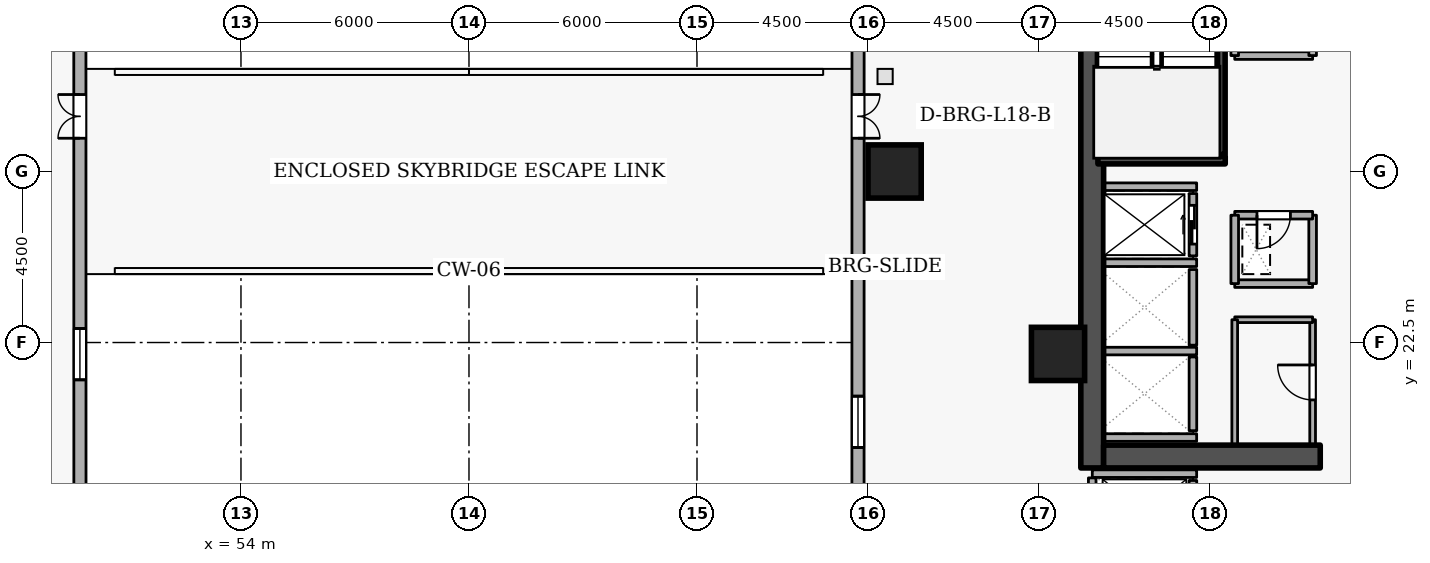
"""IFC4 building model, lengths in metres.
Left out: names, types, materials, properties, quantities, classifications, styles, units other than length and angle.
Written with IfcOpenShell. Run it as: python <this file> out.ifc"""

import sys

from ifc_helpers import new_model, si_unit, direction, frame, frame_2d, origin, origin_2d, place, context, subcontext, project, spatial, rectangle, extrude, element, fill, save


model = new_model("IFC4")
c1 = context("Model", 3, precision=1e-05, world=origin(), true_north=direction((0.0, 1.0)))
c2 = subcontext(c1, "Body", "Model", "MODEL_VIEW")
j1 = project(units=[si_unit("LENGTHUNIT", "METRE"), si_unit("PLANEANGLEUNIT", "RADIAN")], contexts=[c1])
p1 = place(None, origin())
s1 = spatial("IfcSite", under=j1, at=p1, CompositionType="ELEMENT")
p2 = place(p1, origin())
s2 = spatial("IfcBuilding", under=s1, at=p2, CompositionType="ELEMENT")
p3 = place(p2, frame((0.0, 0.0, 71.7)))
s3 = spatial("IfcBuildingStorey", under=s2, at=p3, CompositionType="ELEMENT", Elevation=71.7)
p4 = place(p3, frame((76.4, 19.2, 0.0), z_axis=(0.0, 0.0, 1.0), x_axis=(0.0, 1.0, 0.0)))
e1 = element("IfcWall", 1, at=p4, inside=s3, PredefinedType="SHEAR", context=c2, shape_type="SweptSolid", body=[
    extrude(rectangle(XDim=15.6, YDim=0.6, at=frame_2d((7.8, 0.0))), origin(), (0.0, 0.0, 1.0), 4.2),
])
p5 = place(p3, frame((76.7, 19.5, 0.0), z_axis=(0.0, 0.0, 1.0), x_axis=(1.0, 0.0, 0.0)))
e2 = element("IfcWall", 2, at=p5, inside=s3, PredefinedType="SHEAR", context=c2, shape_type="SweptSolid", body=[
    extrude(rectangle(XDim=5.7, YDim=0.6, at=frame_2d((2.85, 0.0))), origin(), (0.0, 0.0, 1.0), 4.2),
])
for number, where, z_axis, x_axis in (
    (3, (71.2, 27.0, 0.0), (0.0, 0.0, 1.0), (1.0, 0.0, 0.0)),
    (4, (75.5, 22.2, 0.0), (0.0, 0.0, 1.0), (1.0, 0.0, 0.0)),
):
    element("IfcColumn", number, at=place(p3, frame(where, z_axis=z_axis, x_axis=x_axis)), inside=s3, PredefinedType="COLUMN", context=c2, shape_type="SweptSolid", body=[
        extrude(rectangle(XDim=1.4, YDim=1.4, at=origin_2d()), origin(), (0.0, 0.0, 1.0), 4.2),
    ])
p6 = place(p3, frame((49.765, 5.319, 0.0), z_axis=(0.0, 0.0, 1.0), x_axis=(-0.000164732205, 0.999999986432, 0.0)))
e5 = element("IfcWall", 5, at=p6, inside=s3, PredefinedType="STANDARD", context=c2, shape_type="SweptSolid", body=[
    extrude(rectangle(XDim=35.569, YDim=0.32, at=frame_2d((17.785, 0.0))), origin(), (0.0, 0.0, 1.0), 2.24),
])
p7 = place(p6, frame((22.556, 0.0, 0.0)))
e6 = element("IfcOpeningElement", 6, at=p7, cuts=e5, PredefinedType="OPENING", context=c2, shape_type="SweptSolid", body=[
    extrude(rectangle(XDim=1.15, YDim=2.1, at=frame_2d((0.575, 1.05))), frame((0.0, 0.17, 0.0), z_axis=(0.0, -1.0, 0.0), x_axis=(1.0, 0.0, 0.0)), (0.0, 0.0, 1.0), 0.34),
])
p8 = place(p6, frame((1.8, 0.0, 0.72)))
e7 = element("IfcOpeningElement", 7, at=p8, cuts=e5, PredefinedType="OPENING", context=c2, shape_type="SweptSolid", body=[
    extrude(rectangle(XDim=1.35, YDim=1.05, at=frame_2d((0.675, 0.525))), frame((0.0, 0.17, 0.0), z_axis=(0.0, -1.0, 0.0), x_axis=(1.0, 0.0, 0.0)), (0.0, 0.0, 1.0), 0.34),
])
p9 = place(p6, frame((6.6, 0.0, 0.72)))
e8 = element("IfcOpeningElement", 8, at=p9, cuts=e5, PredefinedType="OPENING", context=c2, shape_type="SweptSolid", body=[
    extrude(rectangle(XDim=1.35, YDim=1.05, at=frame_2d((0.675, 0.525))), frame((0.0, 0.17, 0.0), z_axis=(0.0, -1.0, 0.0), x_axis=(1.0, 0.0, 0.0)), (0.0, 0.0, 1.0), 0.34),
])
p10 = place(p6, frame((11.4, 0.0, 0.72)))
e9 = element("IfcOpeningElement", 9, at=p10, cuts=e5, PredefinedType="OPENING", context=c2, shape_type="SweptSolid", body=[
    extrude(rectangle(XDim=1.35, YDim=1.05, at=frame_2d((0.675, 0.525))), frame((0.0, 0.17, 0.0), z_axis=(0.0, -1.0, 0.0), x_axis=(1.0, 0.0, 0.0)), (0.0, 0.0, 1.0), 0.34),
])
p11 = place(p6, frame((16.2, 0.0, 0.72)))
e10 = element("IfcOpeningElement", 10, at=p11, cuts=e5, PredefinedType="OPENING", context=c2, shape_type="SweptSolid", body=[
    extrude(rectangle(XDim=1.35, YDim=1.05, at=frame_2d((0.675, 0.525))), frame((0.0, 0.17, 0.0), z_axis=(0.0, -1.0, 0.0), x_axis=(1.0, 0.0, 0.0)), (0.0, 0.0, 1.0), 0.34),
])
p12 = place(p6, frame((25.8, 0.0, 0.72)))
e11 = element("IfcOpeningElement", 11, at=p12, cuts=e5, PredefinedType="OPENING", context=c2, shape_type="SweptSolid", body=[
    extrude(rectangle(XDim=1.35, YDim=1.05, at=frame_2d((0.675, 0.525))), frame((0.0, 0.17, 0.0), z_axis=(0.0, -1.0, 0.0), x_axis=(1.0, 0.0, 0.0)), (0.0, 0.0, 1.0), 0.34),
])
p13 = place(p6, frame((30.6, 0.0, 0.72)))
e12 = element("IfcOpeningElement", 12, at=p13, cuts=e5, PredefinedType="OPENING", context=c2, shape_type="SweptSolid", body=[
    extrude(rectangle(XDim=1.35, YDim=1.05, at=frame_2d((0.675, 0.525))), frame((0.0, 0.17, 0.0), z_axis=(0.0, -1.0, 0.0), x_axis=(1.0, 0.0, 0.0)), (0.0, 0.0, 1.0), 0.34),
])
p14 = place(p3, frame((70.241, 46.888, 0.0), z_axis=(0.0, 0.0, 1.0), x_axis=(-0.000164732205, -0.999999986432, 0.0)))
e13 = element("IfcWall", 13, at=p14, inside=s3, PredefinedType="STANDARD", context=c2, shape_type="SweptSolid", body=[
    extrude(rectangle(XDim=35.569, YDim=0.32, at=frame_2d((17.785, 0.0))), origin(), (0.0, 0.0, 1.0), 2.24),
])
p15 = place(p14, frame((17.863, 0.0, 0.0)))
e14 = element("IfcOpeningElement", 14, at=p15, cuts=e13, PredefinedType="OPENING", context=c2, shape_type="SweptSolid", body=[
    extrude(rectangle(XDim=1.15, YDim=2.1, at=frame_2d((0.575, 1.05))), frame((0.0, 0.17, 0.0), z_axis=(0.0, -1.0, 0.0), x_axis=(1.0, 0.0, 0.0)), (0.0, 0.0, 1.0), 0.34),
])
p16 = place(p14, frame((1.8, 0.0, 0.72)))
e15 = element("IfcOpeningElement", 15, at=p16, cuts=e13, PredefinedType="OPENING", context=c2, shape_type="SweptSolid", body=[
    extrude(rectangle(XDim=1.35, YDim=1.05, at=frame_2d((0.675, 0.525))), frame((0.0, 0.17, 0.0), z_axis=(0.0, -1.0, 0.0), x_axis=(1.0, 0.0, 0.0)), (0.0, 0.0, 1.0), 0.34),
])
p17 = place(p14, frame((11.4, 0.0, 0.72)))
e16 = element("IfcOpeningElement", 16, at=p17, cuts=e13, PredefinedType="OPENING", context=c2, shape_type="SweptSolid", body=[
    extrude(rectangle(XDim=1.35, YDim=1.05, at=frame_2d((0.675, 0.525))), frame((0.0, 0.17, 0.0), z_axis=(0.0, -1.0, 0.0), x_axis=(1.0, 0.0, 0.0)), (0.0, 0.0, 1.0), 0.34),
])
p18 = place(p14, frame((25.8, 0.0, 0.72)))
e17 = element("IfcOpeningElement", 17, at=p18, cuts=e13, PredefinedType="OPENING", context=c2, shape_type="SweptSolid", body=[
    extrude(rectangle(XDim=1.35, YDim=1.05, at=frame_2d((0.675, 0.525))), frame((0.0, 0.17, 0.0), z_axis=(0.0, -1.0, 0.0), x_axis=(1.0, 0.0, 0.0)), (0.0, 0.0, 1.0), 0.34),
])
p19 = place(p3, frame((79.05, 24.78, 0.0), z_axis=(0.0, 0.0, 1.0), x_axis=(0.0, 1.0, 0.0)))
e18 = element("IfcWall", 18, at=p19, inside=s3, PredefinedType="STANDARD", context=c2, shape_type="SweptSolid", body=[
    extrude(rectangle(XDim=1.64, YDim=0.2, at=frame_2d((0.82, 0.0))), origin(), (0.0, 0.0, 1.0), 3.86),
])
p20 = place(p19, frame((0.31, 0.0, 0.0)))
e19 = element("IfcOpeningElement", 19, at=p20, cuts=e18, PredefinedType="OPENING", context=c2, shape_type="SweptSolid", body=[
    extrude(rectangle(XDim=1.02, YDim=2.06, at=frame_2d((0.51, 1.03))), frame((0.0, 0.11, 0.0), z_axis=(0.0, -1.0, 0.0), x_axis=(1.0, 0.0, 0.0)), (0.0, 0.0, 1.0), 0.22),
])
p21 = place(p3, frame((79.05, 22.43, 0.0), z_axis=(0.0, 0.0, 1.0), x_axis=(0.0, 1.0, 0.0)))
e20 = element("IfcWall", 20, at=p21, inside=s3, PredefinedType="STANDARD", context=c2, shape_type="SweptSolid", body=[
    extrude(rectangle(XDim=1.99, YDim=0.2, at=frame_2d((0.995, 0.0))), origin(), (0.0, 0.0, 1.0), 3.86),
])
p22 = place(p3, frame((79.05, 20.18, 0.0), z_axis=(0.0, 0.0, 1.0), x_axis=(0.0, 1.0, 0.0)))
e21 = element("IfcWall", 21, at=p22, inside=s3, PredefinedType="STANDARD", context=c2, shape_type="SweptSolid", body=[
    extrude(rectangle(XDim=1.94, YDim=0.2, at=frame_2d((0.97, 0.0))), origin(), (0.0, 0.0, 1.0), 3.86),
])
p23 = place(p3, frame((79.05, 17.13, 0.0), z_axis=(0.0, 0.0, 1.0), x_axis=(0.0, 1.0, 0.0)))
e22 = element("IfcWall", 22, at=p23, inside=s3, PredefinedType="STANDARD", context=c2, shape_type="SweptSolid", body=[
    extrude(rectangle(XDim=1.74, YDim=0.2, at=frame_2d((0.87, 0.0))), origin(), (0.0, 0.0, 1.0), 3.86),
])
p24 = place(p23, frame((0.36, 0.0, 0.0)))
e23 = element("IfcOpeningElement", 23, at=p24, cuts=e22, PredefinedType="OPENING", context=c2, shape_type="SweptSolid", body=[
    extrude(rectangle(XDim=1.02, YDim=2.06, at=frame_2d((0.51, 1.03))), frame((0.0, 0.11, 0.0), z_axis=(0.0, -1.0, 0.0), x_axis=(1.0, 0.0, 0.0)), (0.0, 0.0, 1.0), 0.22),
])
p25 = place(p3, frame((76.712, 26.6, 0.0), z_axis=(0.0, 0.0, 1.0), x_axis=(1.0, 0.0, 0.0)))
e24 = element("IfcWall", 24, at=p25, inside=s3, PredefinedType="STANDARD", context=c2, shape_type="SweptSolid", body=[
    extrude(rectangle(XDim=2.436, YDim=0.2, at=frame_2d((1.218, 0.0))), origin(), (0.0, 0.0, 1.0), 2.285),
])
for number, where, z_axis, x_axis in (
    (25, (76.712, 24.6, 0.0), (0.0, 0.0, 1.0), (1.0, 0.0, 0.0)),
    (26, (76.712, 22.275, 0.0), (0.0, 0.0, 1.0), (1.0, 0.0, 0.0)),
    (27, (76.712, 20.0, 0.0), (0.0, 0.0, 1.0), (1.0, 0.0, 0.0)),
):
    element("IfcWall", number, at=place(p3, frame(where, z_axis=z_axis, x_axis=x_axis)), inside=s3, PredefinedType="STANDARD", context=c2, shape_type="SweptSolid", body=[
        extrude(rectangle(XDim=2.436, YDim=0.2, at=frame_2d((1.218, 0.0))), origin(), (0.0, 0.0, 1.0), 3.86),
    ])
p26 = place(p3, frame((76.402, 19.05, 0.0), z_axis=(0.0, 0.0, 1.0), x_axis=(1.0, 0.0, 0.0)))
e28 = element("IfcWall", 28, at=p26, inside=s3, PredefinedType="STANDARD", context=c2, shape_type="SweptSolid", body=[
    extrude(rectangle(XDim=2.746, YDim=0.2, at=frame_2d((1.373, 0.0))), origin(), (0.0, 0.0, 1.0), 3.065),
])
p27 = place(p3, frame((76.4, 17.082, 0.0), z_axis=(0.0, 0.0, 1.0), x_axis=(0.0, 1.0, 0.0)))
e29 = element("IfcWall", 29, at=p27, inside=s3, PredefinedType="STANDARD", context=c2, shape_type="SweptSolid", body=[
    extrude(rectangle(XDim=1.856, YDim=0.2, at=frame_2d((0.928, 0.0))), origin(), (0.0, 0.0, 1.0), 3.86),
])
p28 = place(p3, frame((79.9, 27.3, 0.0), z_axis=(0.0, 0.0, 1.0), x_axis=(-1.0, 0.0, 0.0)))
e30 = element("IfcWall", 30, at=p28, inside=s3, PredefinedType="SHEAR", context=c2, shape_type="SweptSolid", body=[
    extrude(rectangle(XDim=3.35, YDim=0.2, at=frame_2d((1.675, 0.0))), origin(), (0.0, 0.0, 1.0), 4.2),
])
p29 = place(p3, frame((79.797, 27.45, 0.0), z_axis=(0.0, 0.0, 1.0), x_axis=(0.0, 1.0, 0.0)))
e31 = element("IfcWall", 31, at=p29, inside=s3, PredefinedType="SHEAR", context=c2, shape_type="SweptSolid", body=[
    extrude(rectangle(XDim=7.1, YDim=0.2, at=frame_2d((3.55, 0.0))), origin(), (0.0, 0.0, 1.0), 4.2),
])
p30 = place(p3, frame((80.15, 24.05, 0.0), z_axis=(0.0, 0.0, 1.0), x_axis=(1.0, 0.0, 0.0)))
e32 = element("IfcWall", 32, at=p30, inside=s3, PredefinedType="STANDARD", context=c2, shape_type="SweptSolid", body=[
    extrude(rectangle(XDim=2.05, YDim=0.2, at=frame_2d((1.025, 0.0))), origin(), (0.0, 0.0, 1.0), 3.86),
])
p31 = place(p3, frame((82.2, 24.05, 0.0), z_axis=(0.0, 0.0, 1.0), x_axis=(0.0, 1.0, 0.0)))
e33 = element("IfcWall", 33, at=p31, inside=s3, PredefinedType="STANDARD", context=c2, shape_type="SweptSolid", body=[
    extrude(rectangle(XDim=1.8, YDim=0.2, at=frame_2d((0.9, 0.0))), origin(), (0.0, 0.0, 1.0), 3.86),
])
p32 = place(p3, frame((82.2, 25.85, 0.0), z_axis=(0.0, 0.0, 1.0), x_axis=(-1.0, 0.0, 0.0)))
e34 = element("IfcWall", 34, at=p32, inside=s3, PredefinedType="STANDARD", context=c2, shape_type="SweptSolid", body=[
    extrude(rectangle(XDim=2.05, YDim=0.2, at=frame_2d((1.025, 0.0))), origin(), (0.0, 0.0, 1.0), 3.86),
])
p33 = place(p32, frame((0.585, 0.0, 0.0)))
e35 = element("IfcOpeningElement", 35, at=p33, cuts=e34, PredefinedType="OPENING", context=c2, shape_type="SweptSolid", body=[
    extrude(rectangle(XDim=0.88, YDim=2.04, at=frame_2d((0.44, 1.02))), frame((0.0, 0.11, 0.0), z_axis=(0.0, -1.0, 0.0), x_axis=(1.0, 0.0, 0.0)), (0.0, 0.0, 1.0), 0.22),
])
p34 = place(p3, frame((80.15, 25.85, 0.0), z_axis=(0.0, 0.0, 1.0), x_axis=(0.0, -1.0, 0.0)))
e36 = element("IfcWall", 36, at=p34, inside=s3, PredefinedType="STANDARD", context=c2, shape_type="SweptSolid", body=[
    extrude(rectangle(XDim=1.8, YDim=0.2, at=frame_2d((0.9, 0.0))), origin(), (0.0, 0.0, 1.0), 3.86),
])
p35 = place(p3, frame((80.15, 30.05, 0.0), z_axis=(0.0, 0.0, 1.0), x_axis=(1.0, 0.0, 0.0)))
e37 = element("IfcWall", 37, at=p35, inside=s3, PredefinedType="STANDARD", context=c2, shape_type="SweptSolid", body=[
    extrude(rectangle(XDim=2.05, YDim=0.2, at=frame_2d((1.025, 0.0))), origin(), (0.0, 0.0, 1.0), 3.86),
])
p36 = place(p3, frame((82.2, 30.05, 0.0), z_axis=(0.0, 0.0, 1.0), x_axis=(0.0, 1.0, 0.0)))
e38 = element("IfcWall", 38, at=p36, inside=s3, PredefinedType="STANDARD", context=c2, shape_type="SweptSolid", body=[
    extrude(rectangle(XDim=1.8, YDim=0.2, at=frame_2d((0.9, 0.0))), origin(), (0.0, 0.0, 1.0), 3.86),
])
p37 = place(p36, frame((0.46, 0.0, 0.0)))
e39 = element("IfcOpeningElement", 39, at=p37, cuts=e38, PredefinedType="OPENING", context=c2, shape_type="SweptSolid", body=[
    extrude(rectangle(XDim=0.88, YDim=2.04, at=frame_2d((0.44, 1.02))), frame((0.0, 0.11, 0.0), z_axis=(0.0, -1.0, 0.0), x_axis=(1.0, 0.0, 0.0)), (0.0, 0.0, 1.0), 0.22),
])
p38 = place(p3, frame((80.15, 31.85, 0.0), z_axis=(0.0, 0.0, 1.0), x_axis=(0.0, -1.0, 0.0)))
e40 = element("IfcWall", 40, at=p38, inside=s3, PredefinedType="STANDARD", context=c2, shape_type="SweptSolid", body=[
    extrude(rectangle(XDim=1.8, YDim=0.2, at=frame_2d((0.9, 0.0))), origin(), (0.0, 0.0, 1.0), 3.86),
])
p39 = place(p3, frame((82.2, 19.8, 0.0), z_axis=(0.0, 0.0, 1.0), x_axis=(0.0, 1.0, 0.0)))
e41 = element("IfcWall", 41, at=p39, inside=s3, PredefinedType="PARTITIONING", context=c2, shape_type="SweptSolid", body=[
    extrude(rectangle(XDim=3.3, YDim=0.15, at=frame_2d((1.65, 0.0))), origin(), (0.0, 0.0, 1.0), 3.86),
])
p40 = place(p39, frame((1.19, 0.0, 0.0)))
e42 = element("IfcOpeningElement", 42, at=p40, cuts=e41, PredefinedType="OPENING", context=c2, shape_type="SweptSolid", body=[
    extrude(rectangle(XDim=0.92, YDim=2.08, at=frame_2d((0.46, 1.04))), frame((0.0, 0.085, 0.0), z_axis=(0.0, -1.0, 0.0), x_axis=(1.0, 0.0, 0.0)), (0.0, 0.0, 1.0), 0.17),
])
p41 = place(p3, frame((82.2, 23.1, 0.0), z_axis=(0.0, 0.0, 1.0), x_axis=(-1.0, 0.0, 0.0)))
e43 = element("IfcWall", 43, at=p41, inside=s3, PredefinedType="PARTITIONING", context=c2, shape_type="SweptSolid", body=[
    extrude(rectangle(XDim=2.05, YDim=0.15, at=frame_2d((1.025, 0.0))), origin(), (0.0, 0.0, 1.0), 3.86),
])
p42 = place(p3, frame((80.15, 23.1, 0.0), z_axis=(0.0, 0.0, 1.0), x_axis=(0.0, -1.0, 0.0)))
e44 = element("IfcWall", 44, at=p42, inside=s3, PredefinedType="PARTITIONING", context=c2, shape_type="SweptSolid", body=[
    extrude(rectangle(XDim=3.3, YDim=0.15, at=frame_2d((1.65, 0.0))), origin(), (0.0, 0.0, 1.0), 3.86),
])
p43 = place(p7, origin())
e45 = element("IfcDoor", 45, at=p43, inside=s3, OperationType="DOUBLE_DOOR_SINGLE_SWING", PredefinedType="DOOR", context=c2, shape_type="SweptSolid", body=[
    extrude(rectangle(XDim=1.15, YDim=2.1, at=frame_2d((0.575, 1.05))), frame((0.0, 0.025, 0.0), z_axis=(0.0, -1.0, 0.0), x_axis=(1.0, 0.0, 0.0)), (0.0, 0.0, 1.0), 0.05),
])
fill(e6, e45)
p44 = place(p11, origin())
e46 = element("IfcWindow", 46, at=p44, inside=s3, PartitioningType="SINGLE_PANEL", PredefinedType="WINDOW", context=c2, shape_type="SweptSolid", body=[
    extrude(rectangle(XDim=1.35, YDim=1.05, at=frame_2d((0.675, 0.525))), frame((0.0, 0.03, 0.0), z_axis=(0.0, -1.0, 0.0), x_axis=(1.0, 0.0, 0.0)), (0.0, 0.0, 1.0), 0.06),
])
fill(e10, e46)
p45 = place(p15, origin())
e47 = element("IfcDoor", 47, at=p45, inside=s3, OperationType="DOUBLE_DOOR_SINGLE_SWING", PredefinedType="DOOR", context=c2, shape_type="SweptSolid", body=[
    extrude(rectangle(XDim=1.15, YDim=2.1, at=frame_2d((0.575, 1.05))), frame((0.0, 0.025, 0.0), z_axis=(0.0, -1.0, 0.0), x_axis=(1.0, 0.0, 0.0)), (0.0, 0.0, 1.0), 0.05),
])
fill(e14, e47)
p46 = place(p18, origin())
e48 = element("IfcWindow", 48, at=p46, inside=s3, PartitioningType="SINGLE_PANEL", PredefinedType="WINDOW", context=c2, shape_type="SweptSolid", body=[
    extrude(rectangle(XDim=1.35, YDim=1.05, at=frame_2d((0.675, 0.525))), frame((0.0, 0.03, 0.0), z_axis=(0.0, -1.0, 0.0), x_axis=(1.0, 0.0, 0.0)), (0.0, 0.0, 1.0), 0.06),
])
fill(e17, e48)
p47 = place(p20, origin())
e49 = element("IfcDoor", 49, at=p47, inside=s3, OperationType="SLIDING_TO_LEFT", PredefinedType="DOOR", context=c2, shape_type="SweptSolid", body=[
    extrude(rectangle(XDim=1.02, YDim=2.06, at=frame_2d((0.51, 1.03))), frame((0.0, 0.025, 0.0), z_axis=(0.0, -1.0, 0.0), x_axis=(1.0, 0.0, 0.0)), (0.0, 0.0, 1.0), 0.05),
])
fill(e19, e49)
p48 = place(p33, origin())
e50 = element("IfcDoor", 50, at=p48, inside=s3, OperationType="SINGLE_SWING_RIGHT", PredefinedType="DOOR", context=c2, shape_type="SweptSolid", body=[
    extrude(rectangle(XDim=0.88, YDim=2.04, at=frame_2d((0.44, 1.02))), frame((0.0, 0.025, 0.0), z_axis=(0.0, -1.0, 0.0), x_axis=(1.0, 0.0, 0.0)), (0.0, 0.0, 1.0), 0.05),
])
fill(e35, e50)
p49 = place(p40, origin())
e51 = element("IfcDoor", 51, at=p49, inside=s3, OperationType="SINGLE_SWING_RIGHT", PredefinedType="DOOR", context=c2, shape_type="SweptSolid", body=[
    extrude(rectangle(XDim=0.92, YDim=2.08, at=frame_2d((0.46, 1.04))), frame((0.0, 0.025, 0.0), z_axis=(0.0, -1.0, 0.0), x_axis=(1.0, 0.0, 0.0)), (0.0, 0.0, 1.0), 0.05),
])
fill(e42, e51)
save(model, sys.argv[1])
